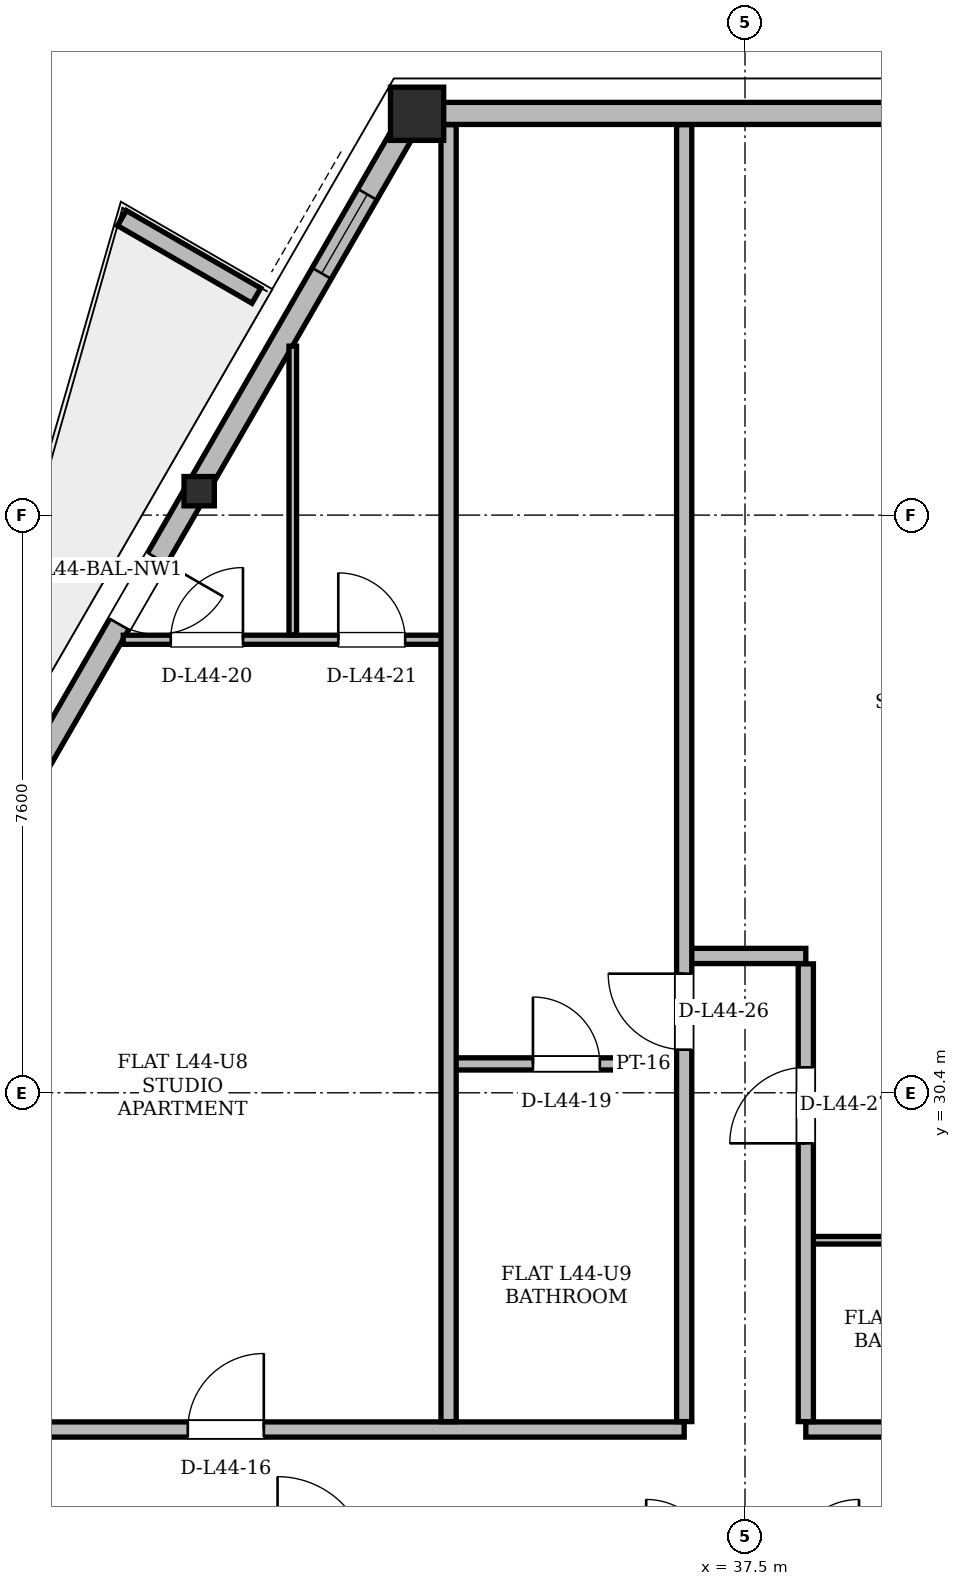
"""IFC4 building model, lengths in metres.
Left out: names, types, materials, properties, quantities, classifications, styles, units other than length and angle.
Written with IfcOpenShell. Run it as: python <this file> out.ifc"""

import sys

from ifc_helpers import new_model, si_unit, direction, frame, frame_2d, origin, origin_2d, place, context, subcontext, project, spatial, polyline, rectangle, hollow_rectangle, i_section, outline, extrude, element, fill, save


model = new_model("IFC4")
c1 = context("Model", 3, precision=1e-05, world=origin(), true_north=direction((0.0, 1.0)))
c2 = subcontext(c1, "Body", "Model", "MODEL_VIEW")
j1 = project(units=[si_unit("LENGTHUNIT", "METRE"), si_unit("PLANEANGLEUNIT", "RADIAN")], contexts=[c1])
p1 = place(None, origin())
s1 = spatial("IfcSite", under=j1, at=p1, CompositionType="ELEMENT")
p2 = place(p1, origin())
s2 = spatial("IfcBuilding", under=s1, at=p2, CompositionType="ELEMENT")
p3 = place(p2, frame((0.0, 0.0, 167.4)))
s3 = spatial("IfcBuildingStorey", under=s2, at=p3, CompositionType="ELEMENT", Elevation=167.4)
p4 = place(p3, frame((33.146, 43.285, 0.005), z_axis=(0.022293656021, -0.002582801612, 0.999748129299), x_axis=(0.115083900766, 0.99335577503, 0.0)))
e1 = element("IfcColumn", 1, at=p4, inside=s3, PredefinedType="COLUMN", context=c2, shape_type="SweptSolid", body=[
    extrude(hollow_rectangle(XDim=0.7, YDim=0.7, WallThickness=0.055, at=origin_2d()), origin(), (0.0, 0.0, 1.0), 3.592),
])
p5 = place(p3, frame((30.281, 38.324, 0.005), z_axis=(0.020798819059, -0.005097749769, 0.999770684744), x_axis=(0.238052057965, 0.971252396496, 0.0)))
e2 = element("IfcColumn", 2, at=p5, inside=s3, PredefinedType="COLUMN", context=c2, shape_type="SweptSolid", body=[
    extrude(i_section(OverallWidth=0.399, OverallDepth=0.386, WebThickness=0.021, FlangeThickness=0.033, at=origin_2d()), origin(), (0.0, 0.0, 1.0), 3.592),
])
p6 = place(p3, frame((41.854, 43.285, 0.0), z_axis=(0.0, 0.0, 1.0), x_axis=(-1.0, 0.0, 0.0)))
e3 = element("IfcWall", 3, at=p6, inside=s3, PredefinedType="SOLIDWALL", context=c2, shape_type="SweptSolid", body=[
    extrude(rectangle(XDim=8.709, YDim=0.29, at=frame_2d((4.354, 0.0))), origin(), (0.0, 0.0, 1.0), 2.6),
])
p7 = place(p3, frame((33.146, 43.285, 0.0), z_axis=(0.0, 0.0, 1.0), x_axis=(-0.499997523705, -0.86602683347, 0.0)))
e4 = element("IfcWall", 4, at=p7, inside=s3, PredefinedType="SOLIDWALL", context=c2, shape_type="SweptSolid", body=[
    extrude(rectangle(XDim=35.802, YDim=0.29, at=frame_2d((17.901, 0.0))), origin(), (0.0, 0.0, 1.0), 2.6),
])
p8 = place(p7, frame((6.76, 0.0, 0.0)))
e5 = element("IfcOpeningElement", 5, at=p8, cuts=e4, PredefinedType="OPENING", context=c2, shape_type="SweptSolid", body=[
    extrude(rectangle(XDim=1.0, YDim=2.18, at=frame_2d((0.5, 1.09))), frame((0.0, 0.145, 0.0), z_axis=(0.0, -1.0, 0.0), x_axis=(1.0, 0.0, 0.0)), (0.0, 0.0, 1.0), 0.29),
])
p9 = place(p7, frame((26.688, 0.0, 0.0)))
e6 = element("IfcOpeningElement", 6, at=p9, cuts=e4, PredefinedType="OPENING", context=c2, shape_type="SweptSolid", body=[
    extrude(rectangle(XDim=1.5, YDim=2.2, at=frame_2d((0.75, 1.1))), frame((0.0, 0.145, 0.0), z_axis=(0.0, -1.0, 0.0), x_axis=(1.0, 0.0, 0.0)), (0.0, 0.0, 1.0), 0.29),
])
p10 = place(p7, frame((33.698, 0.0, 0.85)))
e7 = element("IfcOpeningElement", 7, at=p10, cuts=e4, PredefinedType="OPENING", context=c2, shape_type="SweptSolid", body=[
    extrude(rectangle(XDim=1.2, YDim=1.48, at=frame_2d((0.6, 0.74))), frame((0.0, 0.145, 0.0), z_axis=(0.0, -1.0, 0.0), x_axis=(1.0, 0.0, 0.0)), (0.0, 0.0, 1.0), 0.29),
])
p11 = place(p7, frame((22.123, 0.0, 0.85)))
e8 = element("IfcOpeningElement", 8, at=p11, cuts=e4, PredefinedType="OPENING", context=c2, shape_type="SweptSolid", body=[
    extrude(rectangle(XDim=1.2, YDim=1.48, at=frame_2d((0.6, 0.74))), frame((0.0, 0.145, 0.0), z_axis=(0.0, -1.0, 0.0), x_axis=(1.0, 0.0, 0.0)), (0.0, 0.0, 1.0), 0.29),
])
p12 = place(p7, frame((12.284, 0.0, 0.85)))
e9 = element("IfcOpeningElement", 9, at=p12, cuts=e4, PredefinedType="OPENING", context=c2, shape_type="SweptSolid", body=[
    extrude(rectangle(XDim=1.6, YDim=1.64, at=frame_2d((0.8, 0.82))), frame((0.0, 0.145, 0.0), z_axis=(0.0, -1.0, 0.0), x_axis=(1.0, 0.0, 0.0)), (0.0, 0.0, 1.0), 0.29),
])
p13 = place(p7, frame((17.539, 0.0, 0.85)))
e10 = element("IfcOpeningElement", 10, at=p13, cuts=e4, PredefinedType="OPENING", context=c2, shape_type="SweptSolid", body=[
    extrude(rectangle(XDim=3.0, YDim=1.64, at=frame_2d((1.5, 0.82))), frame((0.0, 0.145, 0.0), z_axis=(0.0, -1.0, 0.0), x_axis=(1.0, 0.0, 0.0)), (0.0, 0.0, 1.0), 0.29),
])
p14 = place(p7, frame((1.23, 0.0, 0.85)))
e11 = element("IfcOpeningElement", 11, at=p14, cuts=e4, PredefinedType="OPENING", context=c2, shape_type="SweptSolid", body=[
    extrude(rectangle(XDim=1.2, YDim=1.48, at=frame_2d((0.6, 0.74))), frame((0.0, 0.145, 0.0), z_axis=(0.0, -1.0, 0.0), x_axis=(1.0, 0.0, 0.0)), (0.0, 0.0, 1.0), 0.29),
])
p15 = place(p7, frame((30.487, 0.0, 0.85)))
e12 = element("IfcOpeningElement", 12, at=p15, cuts=e4, PredefinedType="OPENING", context=c2, shape_type="SweptSolid", body=[
    extrude(rectangle(XDim=1.2, YDim=1.48, at=frame_2d((0.6, 0.74))), frame((0.0, 0.145, 0.0), z_axis=(0.0, -1.0, 0.0), x_axis=(1.0, 0.0, 0.0)), (0.0, 0.0, 1.0), 0.29),
])
p16 = place(p3, frame((31.071, 40.886, 0.0), z_axis=(0.0, 0.0, 1.0), x_axis=(-0.866042246008, 0.499970827278, 0.0)))
e13 = element("IfcWall", 13, at=p16, inside=s3, PredefinedType="PARAPET", context=c2, shape_type="SweptSolid", body=[
    extrude(outline(polyline([(0.0, 0.0), (2.042, 0.0), (2.042, 1.1), (0.0, 1.32), (0.0, 0.0)])), frame((0.0, 0.115, 0.0), z_axis=(0.0, -1.0, 0.0), x_axis=(1.0, 0.0, 0.0)), (0.0, 0.0, 1.0), 0.23),
])
p17 = place(p3, frame((27.55, 25.97, 0.0), z_axis=(0.0, 0.0, 1.0), x_axis=(1.0, 0.0, 0.0)))
e14 = element("IfcWall", 14, at=p17, inside=s3, PredefinedType="PARTITIONING", context=c2, shape_type="SweptSolid", body=[
    extrude(rectangle(XDim=9.15, YDim=0.2, at=frame_2d((4.575, 0.0))), origin(), (0.0, 0.0, 1.0), 2.842),
])
p18 = place(p17, frame((2.619, 0.0, 0.0)))
e15 = element("IfcOpeningElement", 15, at=p18, cuts=e14, PredefinedType="OPENING", context=c2, shape_type="SweptSolid", body=[
    extrude(rectangle(XDim=1.0, YDim=2.18, at=frame_2d((0.5, 1.09))), frame((0.0, 0.1, 0.0), z_axis=(0.0, -1.0, 0.0), x_axis=(1.0, 0.0, 0.0)), (0.0, 0.0, 1.0), 0.2),
])
p19 = place(p3, frame((38.3, 25.97, 0.0), z_axis=(0.0, 0.0, 1.0), x_axis=(1.0, 0.0, 0.0)))
e16 = element("IfcWall", 16, at=p19, inside=s3, PredefinedType="PARTITIONING", context=c2, shape_type="SweptSolid", body=[
    extrude(rectangle(XDim=10.5, YDim=0.2, at=frame_2d((5.25, 0.0))), origin(), (0.0, 0.0, 1.0), 2.842),
])
p20 = place(p19, frame((7.93, 0.0, 0.0)))
e17 = element("IfcOpeningElement", 17, at=p20, cuts=e16, PredefinedType="OPENING", context=c2, shape_type="SweptSolid", body=[
    extrude(rectangle(XDim=1.0, YDim=2.18, at=frame_2d((0.5, 1.09))), frame((0.0, 0.1, 0.0), z_axis=(0.0, -1.0, 0.0), x_axis=(1.0, 0.0, 0.0)), (0.0, 0.0, 1.0), 0.2),
])
p21 = place(p3, frame((38.218, 28.46, 0.0), z_axis=(0.0, 0.0, 1.0), x_axis=(1.0, 0.0, 0.0)))
e18 = element("IfcWall", 18, at=p21, inside=s3, PredefinedType="PARTITIONING", context=c2, shape_type="SweptSolid", body=[
    extrude(rectangle(XDim=7.424, YDim=0.1, at=frame_2d((3.712, 0.0))), origin(), (0.0, 0.0, 1.0), 3.38),
])
p22 = place(p21, frame((3.272, 0.0, 0.0)))
e19 = element("IfcOpeningElement", 19, at=p22, cuts=e18, PredefinedType="OPENING", context=c2, shape_type="SweptSolid", body=[
    extrude(rectangle(XDim=0.88, YDim=2.08, at=frame_2d((0.44, 1.04))), frame((0.0, 0.05, 0.0), z_axis=(0.0, -1.0, 0.0), x_axis=(1.0, 0.0, 0.0)), (0.0, 0.0, 1.0), 0.1),
])
p23 = place(p3, frame((33.518, 30.78, 0.0), z_axis=(0.0, 0.0, 1.0), x_axis=(1.0, 0.0, 0.0)))
e20 = element("IfcWall", 20, at=p23, inside=s3, PredefinedType="PARTITIONING", context=c2, shape_type="SweptSolid", body=[
    extrude(rectangle(XDim=3.264, YDim=0.16, at=frame_2d((1.632, 0.0))), origin(), (0.0, 0.0, 1.0), 3.38),
])
p24 = place(p23, frame((1.192, 0.0, 0.0)))
e21 = element("IfcOpeningElement", 21, at=p24, cuts=e20, PredefinedType="OPENING", context=c2, shape_type="SweptSolid", body=[
    extrude(rectangle(XDim=0.88, YDim=2.08, at=frame_2d((0.44, 1.04))), frame((0.0, 0.08, 0.0), z_axis=(0.0, -1.0, 0.0), x_axis=(1.0, 0.0, 0.0)), (0.0, 0.0, 1.0), 0.16),
])
p25 = place(p3, frame((36.7, 32.2, 0.0), z_axis=(0.0, 0.0, 1.0), x_axis=(1.0, 0.0, 0.0)))
e22 = element("IfcWall", 22, at=p25, inside=s3, PredefinedType="PARTITIONING", context=c2, shape_type="SweptSolid", body=[
    extrude(rectangle(XDim=1.6, YDim=0.2, at=frame_2d((0.8, 0.0))), origin(), (0.0, 0.0, 1.0), 3.38),
])
p26 = place(p3, frame((29.32, 36.36, 0.0), z_axis=(0.0, 0.0, 1.0), x_axis=(1.0, 0.0, 0.0)))
e23 = element("IfcWall", 23, at=p26, inside=s3, PredefinedType="PARTITIONING", context=c2, shape_type="SweptSolid", body=[
    extrude(rectangle(XDim=4.33, YDim=0.12, at=frame_2d((2.165, 0.0))), origin(), (0.0, 0.0, 1.0), 3.38),
])
p27 = place(p26, frame((0.625, 0.0, 0.0)))
e24 = element("IfcOpeningElement", 24, at=p27, cuts=e23, PredefinedType="OPENING", context=c2, shape_type="SweptSolid", body=[
    extrude(rectangle(XDim=0.95, YDim=2.1, at=frame_2d((0.475, 1.05))), frame((0.0, 0.06, 0.0), z_axis=(0.0, -1.0, 0.0), x_axis=(1.0, 0.0, 0.0)), (0.0, 0.0, 1.0), 0.12),
])
p28 = place(p26, frame((2.829, 0.0, 0.0)))
e25 = element("IfcOpeningElement", 25, at=p28, cuts=e23, PredefinedType="OPENING", context=c2, shape_type="SweptSolid", body=[
    extrude(rectangle(XDim=0.88, YDim=2.08, at=frame_2d((0.44, 1.04))), frame((0.0, 0.06, 0.0), z_axis=(0.0, -1.0, 0.0), x_axis=(1.0, 0.0, 0.0)), (0.0, 0.0, 1.0), 0.12),
])
p29 = place(p3, frame((31.55, 36.424, 0.0), z_axis=(0.0, 0.0, 1.0), x_axis=(0.0, 1.0, 0.0)))
e26 = element("IfcWall", 26, at=p29, inside=s3, PredefinedType="PARTITIONING", context=c2, shape_type="SweptSolid", body=[
    extrude(rectangle(XDim=3.799, YDim=0.1, at=frame_2d((1.899, 0.0))), origin(), (0.0, 0.0, 1.0), 3.38),
])
p30 = place(p3, frame((33.6, 26.074, 0.0), z_axis=(0.0, 0.0, 1.0), x_axis=(0.0, 1.0, 0.0)))
e27 = element("IfcWall", 27, at=p30, inside=s3, PredefinedType="PARTITIONING", context=c2, shape_type="SweptSolid", body=[
    extrude(rectangle(XDim=17.062, YDim=0.2, at=frame_2d((8.531, 0.0))), origin(), (0.0, 0.0, 1.0), 3.38),
])
p31 = place(p3, frame((36.7, 26.074, 0.0), z_axis=(0.0, 0.0, 1.0), x_axis=(0.0, 1.0, 0.0)))
e28 = element("IfcWall", 28, at=p31, inside=s3, PredefinedType="PARTITIONING", context=c2, shape_type="SweptSolid", body=[
    extrude(rectangle(XDim=17.062, YDim=0.2, at=frame_2d((8.531, 0.0))), origin(), (0.0, 0.0, 1.0), 3.38),
])
p32 = place(p31, frame((4.893, 0.0, 0.0)))
e29 = element("IfcOpeningElement", 29, at=p32, cuts=e28, PredefinedType="OPENING", context=c2, shape_type="SweptSolid", body=[
    extrude(rectangle(XDim=1.0, YDim=2.18, at=frame_2d((0.5, 1.09))), frame((0.0, 0.1, 0.0), z_axis=(0.0, -1.0, 0.0), x_axis=(1.0, 0.0, 0.0)), (0.0, 0.0, 1.0), 0.2),
])
p33 = place(p3, frame((38.3, 26.074, 0.0), z_axis=(0.0, 0.0, 1.0), x_axis=(0.0, 1.0, 0.0)))
e30 = element("IfcWall", 30, at=p33, inside=s3, PredefinedType="PARTITIONING", context=c2, shape_type="SweptSolid", body=[
    extrude(rectangle(XDim=6.022, YDim=0.2, at=frame_2d((3.011, 0.0))), origin(), (0.0, 0.0, 1.0), 3.38),
])
p34 = place(p33, frame((3.661, 0.0, 0.0)))
e31 = element("IfcOpeningElement", 31, at=p34, cuts=e30, PredefinedType="OPENING", context=c2, shape_type="SweptSolid", body=[
    extrude(rectangle(XDim=1.0, YDim=2.18, at=frame_2d((0.5, 1.09))), frame((0.0, 0.1, 0.0), z_axis=(0.0, -1.0, 0.0), x_axis=(1.0, 0.0, 0.0)), (0.0, 0.0, 1.0), 0.2),
])
p35 = place(p8, origin())
e32 = element("IfcDoor", 32, at=p35, inside=s3, OperationType="SINGLE_SWING_LEFT", PredefinedType="DOOR", context=c2, shape_type="SweptSolid", body=[
    extrude(rectangle(XDim=1.0, YDim=2.18, at=frame_2d((0.5, 1.09))), frame((0.0, 0.025, 0.0), z_axis=(0.0, -1.0, 0.0), x_axis=(1.0, 0.0, 0.0)), (0.0, 0.0, 1.0), 0.05),
])
fill(e5, e32)
p36 = place(p14, origin())
e33 = element("IfcWindow", 33, at=p36, inside=s3, PartitioningType="SINGLE_PANEL", PredefinedType="WINDOW", context=c2, shape_type="SweptSolid", body=[
    extrude(rectangle(XDim=1.2, YDim=1.48, at=frame_2d((0.6, 0.74))), frame((0.0, 0.03, 0.0), z_axis=(0.0, -1.0, 0.0), x_axis=(1.0, 0.0, 0.0)), (0.0, 0.0, 1.0), 0.06),
])
fill(e11, e33)
p37 = place(p18, origin())
e34 = element("IfcDoor", 34, at=p37, inside=s3, OperationType="SINGLE_SWING_RIGHT", PredefinedType="DOOR", context=c2, shape_type="SweptSolid", body=[
    extrude(rectangle(XDim=1.0, YDim=2.18, at=frame_2d((0.5, 1.09))), frame((0.0, 0.025, 0.0), z_axis=(0.0, -1.0, 0.0), x_axis=(1.0, 0.0, 0.0)), (0.0, 0.0, 1.0), 0.05),
])
fill(e15, e34)
p38 = place(p24, origin())
e35 = element("IfcDoor", 35, at=p38, inside=s3, OperationType="SINGLE_SWING_LEFT", PredefinedType="DOOR", context=c2, shape_type="SweptSolid", body=[
    extrude(rectangle(XDim=0.88, YDim=2.08, at=frame_2d((0.44, 1.04))), frame((0.0, 0.025, 0.0), z_axis=(0.0, -1.0, 0.0), x_axis=(1.0, 0.0, 0.0)), (0.0, 0.0, 1.0), 0.05),
])
fill(e21, e35)
p39 = place(p27, origin())
e36 = element("IfcDoor", 36, at=p39, inside=s3, OperationType="SINGLE_SWING_RIGHT", PredefinedType="DOOR", context=c2, shape_type="SweptSolid", body=[
    extrude(rectangle(XDim=0.95, YDim=2.1, at=frame_2d((0.475, 1.05))), frame((0.0, 0.025, 0.0), z_axis=(0.0, -1.0, 0.0), x_axis=(1.0, 0.0, 0.0)), (0.0, 0.0, 1.0), 0.05),
])
fill(e24, e36)
p40 = place(p28, origin())
e37 = element("IfcDoor", 37, at=p40, inside=s3, OperationType="SINGLE_SWING_LEFT", PredefinedType="DOOR", context=c2, shape_type="SweptSolid", body=[
    extrude(rectangle(XDim=0.88, YDim=2.08, at=frame_2d((0.44, 1.04))), frame((0.0, 0.025, 0.0), z_axis=(0.0, -1.0, 0.0), x_axis=(1.0, 0.0, 0.0)), (0.0, 0.0, 1.0), 0.05),
])
fill(e25, e37)
p41 = place(p32, origin())
e38 = element("IfcDoor", 38, at=p41, inside=s3, OperationType="SINGLE_SWING_RIGHT", PredefinedType="DOOR", context=c2, shape_type="SweptSolid", body=[
    extrude(rectangle(XDim=1.0, YDim=2.18, at=frame_2d((0.5, 1.09))), frame((0.0, 0.025, 0.0), z_axis=(0.0, -1.0, 0.0), x_axis=(1.0, 0.0, 0.0)), (0.0, 0.0, 1.0), 0.05),
])
fill(e29, e38)
p42 = place(p34, origin())
e39 = element("IfcDoor", 39, at=p42, inside=s3, OperationType="SINGLE_SWING_LEFT", PredefinedType="DOOR", context=c2, shape_type="SweptSolid", body=[
    extrude(rectangle(XDim=1.0, YDim=2.18, at=frame_2d((0.5, 1.09))), frame((0.0, 0.025, 0.0), z_axis=(0.0, -1.0, 0.0), x_axis=(1.0, 0.0, 0.0)), (0.0, 0.0, 1.0), 0.05),
])
fill(e31, e39)
save(model, sys.argv[1])
